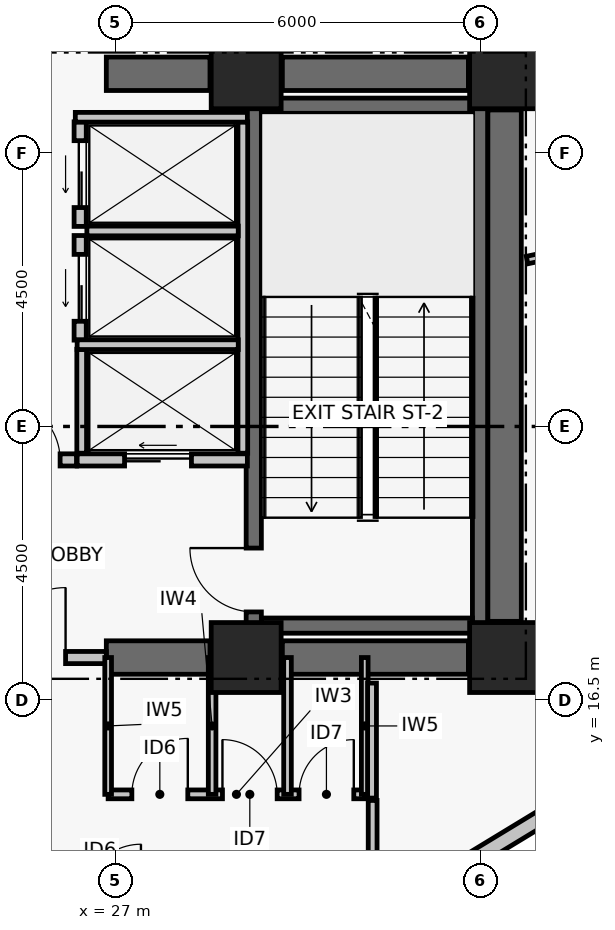
"""IFC4 building model, lengths in metres.
Left out: names, types, materials, properties, quantities, classifications, styles, units other than length and angle.
Written with IfcOpenShell. Run it as: python <this file> out.ifc"""

import sys

from ifc_helpers import new_model, si_unit, direction, frame, frame_2d, origin, origin_2d, place, context, subcontext, project, spatial, rectangle, extrude, element, fill, save


model = new_model("IFC4")
c1 = context("Model", 3, precision=1e-05, world=origin(), true_north=direction((0.0, 1.0)))
c2 = subcontext(c1, "Body", "Model", "MODEL_VIEW")
j1 = project(units=[si_unit("LENGTHUNIT", "METRE"), si_unit("PLANEANGLEUNIT", "RADIAN")], contexts=[c1])
p1 = place(None, origin())
s1 = spatial("IfcSite", under=j1, at=p1, CompositionType="ELEMENT")
p2 = place(p1, origin())
s2 = spatial("IfcBuilding", under=s1, at=p2, CompositionType="ELEMENT")
p3 = place(p2, frame((0.0, 0.0, 118.86)))
s3 = spatial("IfcBuildingStorey", under=s2, at=p3, CompositionType="ELEMENT", Elevation=118.86)
for number, where, z_axis, x_axis in (
    (1, (29.15, 17.2, 0.0), (0.0, 0.0, 1.0), (1.0, 0.0, 0.0)),
    (2, (33.4, 17.2, 0.0), (0.0, 0.0, 1.0), (1.0, 0.0, 0.0)),
    (3, (29.15, 26.8, 0.0), (0.0, 0.0, 1.0), (1.0, 0.0, 0.0)),
    (4, (33.4, 26.8, 0.0), (0.0, 0.0, 1.0), (1.0, 0.0, 0.0)),
):
    element("IfcColumn", number, at=place(p3, frame(where, z_axis=z_axis, x_axis=x_axis)), inside=s3, PredefinedType="COLUMN", context=c2, shape_type="SweptSolid", body=[
        extrude(rectangle(XDim=1.15, YDim=1.15, at=origin_2d()), origin(), (0.0, 0.0, 1.0), 3.72),
    ])
p4 = place(p3, frame((26.85, 17.2, 0.0), z_axis=(0.0, 0.0, 1.0), x_axis=(1.0, 0.0, 0.0)))
e5 = element("IfcWall", 5, at=p4, inside=s3, PredefinedType="SHEAR", context=c2, shape_type="SweptSolid", body=[
    extrude(rectangle(XDim=1.705, YDim=0.55, at=frame_2d((0.853, 0.0))), origin(), (0.0, 0.0, 1.0), 3.47),
])
p5 = place(p3, frame((29.745, 17.2, 0.0), z_axis=(0.0, 0.0, 1.0), x_axis=(1.0, 0.0, 0.0)))
e6 = element("IfcWall", 6, at=p5, inside=s3, PredefinedType="SHEAR", context=c2, shape_type="SweptSolid", body=[
    extrude(rectangle(XDim=3.06, YDim=0.55, at=frame_2d((1.53, 0.0))), origin(), (0.0, 0.0, 1.0), 3.47),
])
p6 = place(p3, frame((26.85, 26.8, 0.0), z_axis=(0.0, 0.0, 1.0), x_axis=(1.0, 0.0, 0.0)))
e7 = element("IfcWall", 7, at=p6, inside=s3, PredefinedType="SHEAR", context=c2, shape_type="SweptSolid", body=[
    extrude(rectangle(XDim=1.705, YDim=0.55, at=frame_2d((0.853, 0.0))), origin(), (0.0, 0.0, 1.0), 3.47),
])
p7 = place(p3, frame((29.745, 26.8, 0.0), z_axis=(0.0, 0.0, 1.0), x_axis=(1.0, 0.0, 0.0)))
e8 = element("IfcWall", 8, at=p7, inside=s3, PredefinedType="SHEAR", context=c2, shape_type="SweptSolid", body=[
    extrude(rectangle(XDim=3.06, YDim=0.55, at=frame_2d((1.53, 0.0))), origin(), (0.0, 0.0, 1.0), 3.47),
])
p8 = place(p3, frame((33.4, 17.795, 0.0), z_axis=(0.0, 0.0, 1.0), x_axis=(0.0, 1.0, 0.0)))
e9 = element("IfcWall", 9, at=p8, inside=s3, PredefinedType="SHEAR", context=c2, shape_type="SweptSolid", body=[
    extrude(rectangle(XDim=8.41, YDim=0.55, at=frame_2d((4.205, 0.0))), origin(), (0.0, 0.0, 1.0), 3.47),
])
p9 = place(p3, frame((29.275, 17.6, 0.0), z_axis=(0.0, 0.0, 1.0), x_axis=(0.0, 1.0, 0.0)))
e10 = element("IfcWall", 10, at=p9, inside=s3, PredefinedType="SHEAR", context=c2, shape_type="SweptSolid", body=[
    extrude(rectangle(XDim=8.8, YDim=0.25, at=frame_2d((4.4, 0.0))), origin(), (0.0, 0.0, 1.0), 3.47),
])
p10 = place(p9, frame((0.35, 0.0, 0.0)))
e11 = element("IfcOpeningElement", 11, at=p10, cuts=e10, PredefinedType="OPENING", context=c2, shape_type="SweptSolid", body=[
    extrude(rectangle(XDim=1.05, YDim=2.08, at=frame_2d((0.525, 1.04))), frame((0.0, 0.135, 0.0), z_axis=(0.0, -1.0, 0.0), x_axis=(1.0, 0.0, 0.0)), (0.0, 0.0, 1.0), 0.27),
])
p11 = place(p3, frame((32.996, 17.6, 0.0), z_axis=(0.0, 0.0, 1.0), x_axis=(0.0, 1.0, 0.0)))
e12 = element("IfcWall", 12, at=p11, inside=s3, PredefinedType="SHEAR", context=c2, shape_type="SweptSolid", body=[
    extrude(rectangle(XDim=8.8, YDim=0.25, at=frame_2d((4.4, 0.0))), origin(), (0.0, 0.0, 1.0), 3.47),
])
for number, where, z_axis, x_axis in (
    (13, (29.4, 17.725, 0.0), (0.0, 0.0, 1.0), (1.0, 0.0, 0.0)),
    (14, (29.4, 26.275, 0.0), (0.0, 0.0, 1.0), (1.0, 0.0, 0.0)),
):
    element("IfcWall", number, at=place(p3, frame(where, z_axis=z_axis, x_axis=x_axis)), inside=s3, PredefinedType="SHEAR", context=c2, shape_type="SweptSolid", body=[
        extrude(rectangle(XDim=3.471, YDim=0.25, at=frame_2d((1.736, 0.0))), origin(), (0.0, 0.0, 1.0), 3.47),
    ])
p12 = place(p3, frame((35.48, 15.455, 0.0), z_axis=(0.0, 0.0, 1.0), x_axis=(-0.854673977685, -0.51916509115, 0.0)))
e15 = element("IfcWall", 15, at=p12, inside=s3, PredefinedType="PARTITIONING", context=c2, shape_type="SweptSolid", body=[
    extrude(rectangle(XDim=6.678, YDim=0.26, at=frame_2d((3.339, 0.0))), origin(), (0.0, 0.0, 1.0), 3.47),
])
p13 = place(p3, frame((24.35, 17.2, 0.0), z_axis=(0.0, 0.0, 1.0), x_axis=(1.0, 0.0, 0.0)))
e16 = element("IfcWall", 16, at=p13, inside=s3, PredefinedType="PARTITIONING", context=c2, shape_type="SweptSolid", body=[
    extrude(rectangle(XDim=2.5, YDim=0.2, at=frame_2d((1.25, 0.0))), origin(), (0.0, 0.0, 1.0), 2.6),
])
p14 = place(p13, frame((0.68, 0.0, 0.0)))
e17 = element("IfcOpeningElement", 17, at=p14, cuts=e16, PredefinedType="OPENING", context=c2, shape_type="SweptSolid", body=[
    extrude(rectangle(XDim=1.15, YDim=2.08, at=frame_2d((0.575, 1.04))), frame((0.0, 0.11, 0.0), z_axis=(0.0, -1.0, 0.0), x_axis=(1.0, 0.0, 0.0)), (0.0, 0.0, 1.0), 0.22),
])
p15 = place(p3, frame((24.84, 20.45, 0.0), z_axis=(0.0, 0.0, 1.0), x_axis=(1.0, 0.0, 0.0)))
e18 = element("IfcWall", 18, at=p15, inside=s3, PredefinedType="PARTITIONING", context=c2, shape_type="SweptSolid", body=[
    extrude(rectangle(XDim=1.52, YDim=0.2, at=frame_2d((0.76, 0.0))), origin(), (0.0, 0.0, 1.0), 3.47),
])
p16 = place(p15, frame((0.27, 0.0, 0.0)))
e19 = element("IfcOpeningElement", 19, at=p16, cuts=e18, PredefinedType="OPENING", context=c2, shape_type="SweptSolid", body=[
    extrude(rectangle(XDim=0.98, YDim=2.06, at=frame_2d((0.49, 1.03))), frame((0.0, 0.11, 0.0), z_axis=(0.0, -1.0, 0.0), x_axis=(1.0, 0.0, 0.0)), (0.0, 0.0, 1.0), 0.22),
])
p17 = place(p3, frame((26.37, 20.45, 0.0), z_axis=(0.0, 0.0, 1.0), x_axis=(1.0, 0.0, 0.0)))
e20 = element("IfcWall", 20, at=p17, inside=s3, PredefinedType="PARTITIONING", context=c2, shape_type="SweptSolid", body=[
    extrude(rectangle(XDim=2.8, YDim=0.2, at=frame_2d((1.4, 0.0))), origin(), (0.0, 0.0, 1.0), 3.47),
])
p18 = place(p17, frame((0.78, 0.0, 0.0)))
e21 = element("IfcOpeningElement", 21, at=p18, cuts=e20, PredefinedType="OPENING", context=c2, shape_type="SweptSolid", body=[
    extrude(rectangle(XDim=1.1, YDim=2.08, at=frame_2d((0.55, 1.04))), frame((0.0, 0.11, 0.0), z_axis=(0.0, -1.0, 0.0), x_axis=(1.0, 0.0, 0.0)), (0.0, 0.0, 1.0), 0.22),
])
p19 = place(p3, frame((26.42, 22.42, 0.0), z_axis=(0.0, 0.0, 1.0), x_axis=(0.0, 1.0, 0.0)))
e22 = element("IfcWall", 22, at=p19, inside=s3, PredefinedType="PARTITIONING", context=c2, shape_type="SweptSolid", body=[
    extrude(rectangle(XDim=1.72, YDim=0.2, at=frame_2d((0.86, 0.0))), origin(), (0.0, 0.0, 1.0), 3.47),
])
p20 = place(p19, frame((0.31, 0.0, 0.0)))
e23 = element("IfcOpeningElement", 23, at=p20, cuts=e22, PredefinedType="OPENING", context=c2, shape_type="SweptSolid", body=[
    extrude(rectangle(XDim=1.1, YDim=2.08, at=frame_2d((0.55, 1.04))), frame((0.0, 0.11, 0.0), z_axis=(0.0, -1.0, 0.0), x_axis=(1.0, 0.0, 0.0)), (0.0, 0.0, 1.0), 0.22),
])
p21 = place(p3, frame((26.42, 24.29, 0.0), z_axis=(0.0, 0.0, 1.0), x_axis=(0.0, 1.0, 0.0)))
e24 = element("IfcWall", 24, at=p21, inside=s3, PredefinedType="PARTITIONING", context=c2, shape_type="SweptSolid", body=[
    extrude(rectangle(XDim=1.72, YDim=0.2, at=frame_2d((0.86, 0.0))), origin(), (0.0, 0.0, 1.0), 3.47),
])
p22 = place(p21, frame((0.31, 0.0, 0.0)))
e25 = element("IfcOpeningElement", 25, at=p22, cuts=e24, PredefinedType="OPENING", context=c2, shape_type="SweptSolid", body=[
    extrude(rectangle(XDim=1.1, YDim=2.08, at=frame_2d((0.55, 1.04))), frame((0.0, 0.11, 0.0), z_axis=(0.0, -1.0, 0.0), x_axis=(1.0, 0.0, 0.0)), (0.0, 0.0, 1.0), 0.22),
])
p23 = place(p3, frame((29.095, 20.56, 0.0), z_axis=(0.0, 0.0, 1.0), x_axis=(0.0, 1.0, 0.0)))
e26 = element("IfcWall", 26, at=p23, inside=s3, PredefinedType="PARTITIONING", context=c2, shape_type="SweptSolid", body=[
    extrude(rectangle(XDim=5.45, YDim=0.16, at=frame_2d((2.725, 0.0))), origin(), (0.0, 0.0, 1.0), 3.47),
])
p24 = place(p3, frame((26.445, 20.56, 0.0), z_axis=(0.0, 0.0, 1.0), x_axis=(0.0, 1.0, 0.0)))
e27 = element("IfcWall", 27, at=p24, inside=s3, PredefinedType="PARTITIONING", context=c2, shape_type="SweptSolid", body=[
    extrude(rectangle(XDim=1.71, YDim=0.16, at=frame_2d((0.855, 0.0))), origin(), (0.0, 0.0, 1.0), 3.47),
])
p25 = place(p3, frame((26.37, 22.345, 0.0), z_axis=(0.0, 0.0, 1.0), x_axis=(1.0, 0.0, 0.0)))
e28 = element("IfcWall", 28, at=p25, inside=s3, PredefinedType="PARTITIONING", context=c2, shape_type="SweptSolid", body=[
    extrude(rectangle(XDim=2.65, YDim=0.16, at=frame_2d((1.325, 0.0))), origin(), (0.0, 0.0, 1.0), 3.47),
])
p26 = place(p3, frame((26.53, 24.215, 0.0), z_axis=(0.0, 0.0, 1.0), x_axis=(1.0, 0.0, 0.0)))
e29 = element("IfcWall", 29, at=p26, inside=s3, PredefinedType="PARTITIONING", context=c2, shape_type="SweptSolid", body=[
    extrude(rectangle(XDim=2.49, YDim=0.16, at=frame_2d((1.245, 0.0))), origin(), (0.0, 0.0, 1.0), 3.47),
])
p27 = place(p3, frame((26.34, 26.085, 0.0), z_axis=(0.0, 0.0, 1.0), x_axis=(1.0, 0.0, 0.0)))
e30 = element("IfcWall", 30, at=p27, inside=s3, PredefinedType="PARTITIONING", context=c2, shape_type="SweptSolid", body=[
    extrude(rectangle(XDim=2.83, YDim=0.16, at=frame_2d((1.415, 0.0))), origin(), (0.0, 0.0, 1.0), 3.47),
])
p28 = place(p3, frame((26.88, 14.95, 0.0), z_axis=(0.0, 0.0, 1.0), x_axis=(1.0, 0.0, 0.0)))
e31 = element("IfcWall", 31, at=p28, inside=s3, PredefinedType="PARTITIONING", context=c2, shape_type="SweptSolid", body=[
    extrude(rectangle(XDim=4.22, YDim=0.145, at=frame_2d((2.11, 0.0))), origin(), (0.0, 0.0, 1.0), 3.05),
])
p29 = place(p28, frame((0.39, 0.0, 0.0)))
e32 = element("IfcOpeningElement", 32, at=p29, cuts=e31, PredefinedType="OPENING", context=c2, shape_type="SweptSolid", body=[
    extrude(rectangle(XDim=0.92, YDim=2.05, at=frame_2d((0.46, 1.025))), frame((0.0, 0.083, 0.0), z_axis=(0.0, -1.0, 0.0), x_axis=(1.0, 0.0, 0.0)), (0.0, 0.0, 1.0), 0.165),
])
p30 = place(p28, frame((1.88, 0.0, 0.0)))
e33 = element("IfcOpeningElement", 33, at=p30, cuts=e31, PredefinedType="OPENING", context=c2, shape_type="SweptSolid", body=[
    extrude(rectangle(XDim=0.9, YDim=2.02, at=frame_2d((0.45, 1.01))), frame((0.0, 0.083, 0.0), z_axis=(0.0, -1.0, 0.0), x_axis=(1.0, 0.0, 0.0)), (0.0, 0.0, 1.0), 0.165),
])
p31 = place(p28, frame((3.14, 0.0, 0.0)))
e34 = element("IfcOpeningElement", 34, at=p31, cuts=e31, PredefinedType="OPENING", context=c2, shape_type="SweptSolid", body=[
    extrude(rectangle(XDim=0.9, YDim=2.02, at=frame_2d((0.45, 1.01))), frame((0.0, 0.083, 0.0), z_axis=(0.0, -1.0, 0.0), x_axis=(1.0, 0.0, 0.0)), (0.0, 0.0, 1.0), 0.165),
])
p32 = place(p3, frame((26.88, 14.95, 0.0), z_axis=(0.0, 0.0, 1.0), x_axis=(0.0, 1.0, 0.0)))
e35 = element("IfcWall", 35, at=p32, inside=s3, PredefinedType="PARTITIONING", context=c2, shape_type="SweptSolid", body=[
    extrude(rectangle(XDim=2.25, YDim=0.11, at=frame_2d((1.125, 0.0))), origin(), (0.0, 0.0, 1.0), 2.6),
])
for number, where, z_axis, x_axis in (
    (36, (28.59, 14.95, 0.0), (0.0, 0.0, 1.0), (0.0, 1.0, 0.0)),
    (37, (29.83, 14.95, 0.0), (0.0, 0.0, 1.0), (0.0, 1.0, 0.0)),
):
    element("IfcWall", number, at=place(p3, frame(where, z_axis=z_axis, x_axis=x_axis)), inside=s3, PredefinedType="PARTITIONING", context=c2, shape_type="SweptSolid", body=[
        extrude(rectangle(XDim=2.25, YDim=0.125, at=frame_2d((1.125, 0.0))), origin(), (0.0, 0.0, 1.0), 2.6),
    ])
p33 = place(p3, frame((31.1, 14.95, 0.0), z_axis=(0.0, 0.0, 1.0), x_axis=(0.0, 1.0, 0.0)))
e38 = element("IfcWall", 38, at=p33, inside=s3, PredefinedType="PARTITIONING", context=c2, shape_type="SweptSolid", body=[
    extrude(rectangle(XDim=2.25, YDim=0.11, at=frame_2d((1.125, 0.0))), origin(), (0.0, 0.0, 1.0), 2.6),
])
p34 = place(p3, frame((31.23, 13.351, 0.0), z_axis=(0.0, 0.0, 1.0), x_axis=(0.0, 1.0, 0.0)))
e39 = element("IfcWall", 39, at=p34, inside=s3, PredefinedType="PARTITIONING", context=c2, shape_type="SweptSolid", body=[
    extrude(rectangle(XDim=1.499, YDim=0.145, at=frame_2d((0.75, 0.0))), origin(), (0.0, 0.0, 1.0), 2.9),
])
p35 = place(p3, frame((31.22, 14.889, 0.0), z_axis=(0.0, 0.0, 1.0), x_axis=(0.0, 1.0, 0.0)))
e40 = element("IfcWall", 40, at=p35, inside=s3, PredefinedType="PARTITIONING", context=c2, shape_type="SweptSolid", body=[
    extrude(rectangle(XDim=1.891, YDim=0.145, at=frame_2d((0.946, 0.0))), origin(), (0.0, 0.0, 1.0), 2.6),
])
p36 = place(p3, frame((33.74, 27.22, 0.0), z_axis=(0.0, 0.0, 1.0), x_axis=(-1.0, 0.0, 0.0)))
e41 = element("IfcWall", 41, at=p36, inside=s3, PredefinedType="PARTITIONING", context=c2, shape_type="SweptSolid", body=[
    extrude(rectangle(XDim=0.86, YDim=0.145, at=frame_2d((0.43, 0.0))), origin(), (0.0, 0.0, 1.0), 2.6),
])
p37 = place(p3, frame((33.77, 23.737, 0.0), z_axis=(0.0, 0.0, 1.0), x_axis=(0.978144206175, 0.20792766032, 0.0)))
e42 = element("IfcWall", 42, at=p37, inside=s3, PredefinedType="PARTITIONING", context=c2, shape_type="SweptSolid", body=[
    extrude(rectangle(XDim=6.102, YDim=0.125, at=frame_2d((3.051, 0.0))), origin(), (0.0, 0.0, 1.0), 2.6),
])
p38 = place(p10, origin())
e43 = element("IfcDoor", 43, at=p38, inside=s3, OperationType="SINGLE_SWING_RIGHT", PredefinedType="DOOR", context=c2, shape_type="SweptSolid", body=[
    extrude(rectangle(XDim=1.05, YDim=2.08, at=frame_2d((0.525, 1.04))), frame((0.0, 0.025, 0.0), z_axis=(0.0, -1.0, 0.0), x_axis=(1.0, 0.0, 0.0)), (0.0, 0.0, 1.0), 0.05),
])
fill(e11, e43)
p39 = place(p14, origin())
e44 = element("IfcDoor", 44, at=p39, inside=s3, OperationType="SINGLE_SWING_RIGHT", PredefinedType="DOOR", context=c2, shape_type="SweptSolid", body=[
    extrude(rectangle(XDim=1.15, YDim=2.08, at=frame_2d((0.575, 1.04))), frame((0.0, 0.025, 0.0), z_axis=(0.0, -1.0, 0.0), x_axis=(1.0, 0.0, 0.0)), (0.0, 0.0, 1.0), 0.05),
])
fill(e17, e44)
p40 = place(p16, origin())
e45 = element("IfcDoor", 45, at=p40, inside=s3, OperationType="SINGLE_SWING_LEFT", PredefinedType="DOOR", context=c2, shape_type="SweptSolid", body=[
    extrude(rectangle(XDim=0.98, YDim=2.06, at=frame_2d((0.49, 1.03))), frame((0.0, 0.025, 0.0), z_axis=(0.0, -1.0, 0.0), x_axis=(1.0, 0.0, 0.0)), (0.0, 0.0, 1.0), 0.05),
])
fill(e19, e45)
p41 = place(p18, origin())
e46 = element("IfcDoor", 46, at=p41, inside=s3, OperationType="DOUBLE_DOOR_SLIDING", PredefinedType="DOOR", context=c2, shape_type="SweptSolid", body=[
    extrude(rectangle(XDim=1.1, YDim=2.08, at=frame_2d((0.55, 1.04))), frame((0.0, 0.025, 0.0), z_axis=(0.0, -1.0, 0.0), x_axis=(1.0, 0.0, 0.0)), (0.0, 0.0, 1.0), 0.05),
])
fill(e21, e46)
p42 = place(p20, origin())
e47 = element("IfcDoor", 47, at=p42, inside=s3, OperationType="DOUBLE_DOOR_SLIDING", PredefinedType="DOOR", context=c2, shape_type="SweptSolid", body=[
    extrude(rectangle(XDim=1.1, YDim=2.08, at=frame_2d((0.55, 1.04))), frame((0.0, 0.025, 0.0), z_axis=(0.0, -1.0, 0.0), x_axis=(1.0, 0.0, 0.0)), (0.0, 0.0, 1.0), 0.05),
])
fill(e23, e47)
p43 = place(p22, origin())
e48 = element("IfcDoor", 48, at=p43, inside=s3, OperationType="DOUBLE_DOOR_SLIDING", PredefinedType="DOOR", context=c2, shape_type="SweptSolid", body=[
    extrude(rectangle(XDim=1.1, YDim=2.08, at=frame_2d((0.55, 1.04))), frame((0.0, 0.025, 0.0), z_axis=(0.0, -1.0, 0.0), x_axis=(1.0, 0.0, 0.0)), (0.0, 0.0, 1.0), 0.05),
])
fill(e25, e48)
p44 = place(p29, origin())
e49 = element("IfcDoor", 49, at=p44, inside=s3, OperationType="SINGLE_SWING_RIGHT", PredefinedType="DOOR", context=c2, shape_type="SweptSolid", body=[
    extrude(rectangle(XDim=0.92, YDim=2.05, at=frame_2d((0.46, 1.025))), frame((0.0, 0.025, 0.0), z_axis=(0.0, -1.0, 0.0), x_axis=(1.0, 0.0, 0.0)), (0.0, 0.0, 1.0), 0.05),
])
fill(e32, e49)
p45 = place(p30, origin())
e50 = element("IfcDoor", 50, at=p45, inside=s3, OperationType="SINGLE_SWING_LEFT", PredefinedType="DOOR", context=c2, shape_type="SweptSolid", body=[
    extrude(rectangle(XDim=0.9, YDim=2.02, at=frame_2d((0.45, 1.01))), frame((0.0, 0.025, 0.0), z_axis=(0.0, -1.0, 0.0), x_axis=(1.0, 0.0, 0.0)), (0.0, 0.0, 1.0), 0.05),
])
fill(e33, e50)
p46 = place(p31, origin())
e51 = element("IfcDoor", 51, at=p46, inside=s3, OperationType="SINGLE_SWING_RIGHT", PredefinedType="DOOR", context=c2, shape_type="SweptSolid", body=[
    extrude(rectangle(XDim=0.9, YDim=2.02, at=frame_2d((0.45, 1.01))), frame((0.0, 0.025, 0.0), z_axis=(0.0, -1.0, 0.0), x_axis=(1.0, 0.0, 0.0)), (0.0, 0.0, 1.0), 0.05),
])
fill(e34, e51)
save(model, sys.argv[1])
